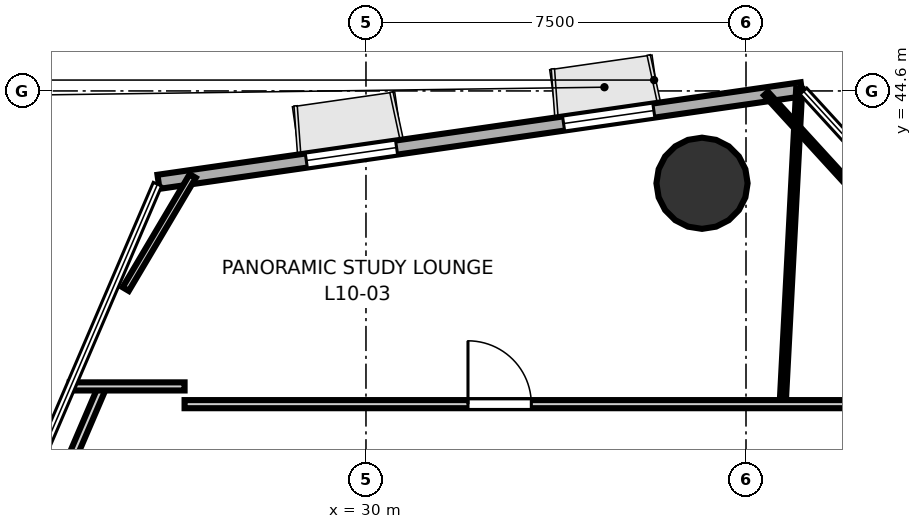
"""IFC4 building model, lengths in metres.
Left out: names, types, materials, properties, quantities, classifications, styles, units other than length and angle.
Written with IfcOpenShell. Run it as: python <this file> out.ifc"""

import sys

from ifc_helpers import new_model, si_unit, direction, frame, frame_2d, origin, origin_2d, place, context, subcontext, project, spatial, rectangle, hollow_circle, extrude, element, fill, save


model = new_model("IFC4")
c1 = context("Model", 3, precision=1e-05, world=origin(), true_north=direction((0.0, 1.0)))
c2 = subcontext(c1, "Body", "Model", "MODEL_VIEW")
j1 = project(units=[si_unit("LENGTHUNIT", "METRE"), si_unit("PLANEANGLEUNIT", "RADIAN")], contexts=[c1])
p1 = place(None, origin())
s1 = spatial("IfcSite", under=j1, at=p1, CompositionType="ELEMENT")
p2 = place(p1, origin())
s2 = spatial("IfcBuilding", under=s1, at=p2, CompositionType="ELEMENT")
p3 = place(p2, frame((0.0, 0.0, 44.2)))
s3 = spatial("IfcBuildingStorey", under=s2, at=p3, CompositionType="ELEMENT", Elevation=44.2)
p4 = place(p3, frame((36.632, 42.778, 0.0), z_axis=(0.0, 0.0, 1.0), x_axis=(1.0, 0.0, 0.0)))
e1 = element("IfcColumn", 1, at=p4, inside=s3, PredefinedType="COLUMN", context=c2, shape_type="SweptSolid", body=[
    extrude(hollow_circle(Radius=0.9, WallThickness=0.045, at=origin_2d()), origin(), (0.0, 0.0, 1.0), 3.7),
])
p5 = place(p3, frame((38.599, 44.633, 0.0), z_axis=(0.0, 0.0, 1.0), x_axis=(-0.98980966225, -0.142396743348, 0.0)))
e2 = element("IfcWall", 2, at=p5, inside=s3, PredefinedType="SOLIDWALL", context=c2, shape_type="SweptSolid", body=[
    extrude(rectangle(XDim=12.824, YDim=0.28, at=frame_2d((6.412, 0.0))), origin(), (0.0, 0.0, 1.0), 3.4),
])
p6 = place(p5, frame((2.947, 0.0, 0.85)))
e3 = element("IfcOpeningElement", 3, at=p6, cuts=e2, PredefinedType="OPENING", context=c2, shape_type="SweptSolid", body=[
    extrude(rectangle(XDim=1.8, YDim=2.1, at=frame_2d((0.9, 1.05))), frame((0.0, 0.15, 0.0), z_axis=(0.0, -1.0, 0.0), x_axis=(1.0, 0.0, 0.0)), (0.0, 0.0, 1.0), 0.3),
])
p7 = place(p5, frame((8.077, 0.0, 0.85)))
e4 = element("IfcOpeningElement", 4, at=p7, cuts=e2, PredefinedType="OPENING", context=c2, shape_type="SweptSolid", body=[
    extrude(rectangle(XDim=1.8, YDim=2.1, at=frame_2d((0.9, 1.05))), frame((0.0, 0.15, 0.0), z_axis=(0.0, -1.0, 0.0), x_axis=(1.0, 0.0, 0.0)), (0.0, 0.0, 1.0), 0.3),
])
p8 = place(p3, frame((23.579, 35.917, 0.0), z_axis=(0.0, 0.0, 1.0), x_axis=(0.393891001625, 0.919157156768, 0.0)))
e5 = element("IfcWall", 5, at=p8, inside=s3, PredefinedType="PARTITIONING", context=c2, shape_type="SweptSolid", body=[
    extrude(rectangle(XDim=3.124, YDim=0.16, at=frame_2d((1.562, 0.0))), origin(), (0.0, 0.0, 1.0), 2.72),
])
p9 = place(p3, frame((24.154, 38.769, 0.0), z_axis=(0.0, 0.0, 1.0), x_axis=(1.0, 0.0, 0.0)))
e6 = element("IfcWall", 6, at=p9, inside=s3, PredefinedType="PARTITIONING", context=c2, shape_type="SweptSolid", body=[
    extrude(rectangle(XDim=2.266, YDim=0.16, at=frame_2d((1.133, 0.0))), origin(), (0.0, 0.0, 1.0), 2.72),
])
p10 = place(p3, frame((26.42, 38.419, 0.0), z_axis=(0.0, 0.0, 1.0), x_axis=(1.0, 0.0, 0.0)))
e7 = element("IfcWall", 7, at=p10, inside=s3, PredefinedType="PARTITIONING", context=c2, shape_type="SweptSolid", body=[
    extrude(rectangle(XDim=15.783, YDim=0.16, at=frame_2d((7.892, 0.0))), origin(), (0.0, 0.0, 1.0), 2.678),
])
p11 = place(p10, frame((5.593, 0.0, 0.0)))
e8 = element("IfcOpeningElement", 8, at=p11, cuts=e7, PredefinedType="OPENING", context=c2, shape_type="SweptSolid", body=[
    extrude(rectangle(XDim=1.25, YDim=2.2, at=frame_2d((0.625, 1.1))), frame((0.0, 0.09, 0.0), z_axis=(0.0, -1.0, 0.0), x_axis=(1.0, 0.0, 0.0)), (0.0, 0.0, 1.0), 0.18),
])
p12 = place(p3, frame((38.23, 38.528, 0.0), z_axis=(0.0, 0.0, 1.0), x_axis=(0.052330816284, 0.998629804115, 0.0)))
e9 = element("IfcWall", 9, at=p12, inside=s3, PredefinedType="PARTITIONING", context=c2, shape_type="SweptSolid", body=[
    extrude(rectangle(XDim=6.125, YDim=0.12, at=frame_2d((3.063, 0.0))), origin(), (0.0, 0.0, 1.0), 2.678),
])
p13 = place(p3, frame((37.896, 44.548, 0.0), z_axis=(0.0, 0.0, 1.0), x_axis=(0.674902776071, -0.737906662697, 0.0)))
e10 = element("IfcWall", 10, at=p13, inside=s3, PredefinedType="PARTITIONING", context=c2, shape_type="SweptSolid", body=[
    extrude(rectangle(XDim=31.144, YDim=0.105, at=frame_2d((15.572, 0.0))), origin(), (0.0, 0.0, 1.0), 2.678),
])
p14 = place(p3, frame((25.259, 40.689, 0.0), z_axis=(0.0, 0.0, 1.0), x_axis=(0.509670804604, 0.860369496748, 0.0)))
e11 = element("IfcWall", 11, at=p14, inside=s3, PredefinedType="PARTITIONING", context=c2, shape_type="SweptSolid", body=[
    extrude(rectangle(XDim=2.594, YDim=0.14, at=frame_2d((1.297, 0.0))), origin(), (0.0, 0.0, 1.0), 2.72),
])
p15 = place(p11, origin())
e12 = element("IfcDoor", 12, at=p15, inside=s3, OperationType="SINGLE_SWING_LEFT", PredefinedType="DOOR", context=c2, shape_type="SweptSolid", body=[
    extrude(rectangle(XDim=1.25, YDim=2.2, at=frame_2d((0.625, 1.1))), frame((0.0, 0.025, 0.0), z_axis=(0.0, -1.0, 0.0), x_axis=(1.0, 0.0, 0.0)), (0.0, 0.0, 1.0), 0.05),
])
fill(e8, e12)
p16 = place(p6, origin())
e13 = element("IfcWindow", 13, at=p16, inside=s3, PartitioningType="SINGLE_PANEL", PredefinedType="WINDOW", context=c2, shape_type="SweptSolid", body=[
    extrude(rectangle(XDim=1.8, YDim=2.1, at=frame_2d((0.9, 1.05))), frame((0.0, 0.03, 0.0), z_axis=(0.0, -1.0, 0.0), x_axis=(1.0, 0.0, 0.0)), (0.0, 0.0, 1.0), 0.06),
])
fill(e3, e13)
p17 = place(p7, origin())
e14 = element("IfcWindow", 14, at=p17, inside=s3, PartitioningType="SINGLE_PANEL", PredefinedType="WINDOW", context=c2, shape_type="SweptSolid", body=[
    extrude(rectangle(XDim=1.8, YDim=2.1, at=frame_2d((0.9, 1.05))), frame((0.0, 0.03, 0.0), z_axis=(0.0, -1.0, 0.0), x_axis=(1.0, 0.0, 0.0)), (0.0, 0.0, 1.0), 0.06),
])
fill(e4, e14)
save(model, sys.argv[1])
